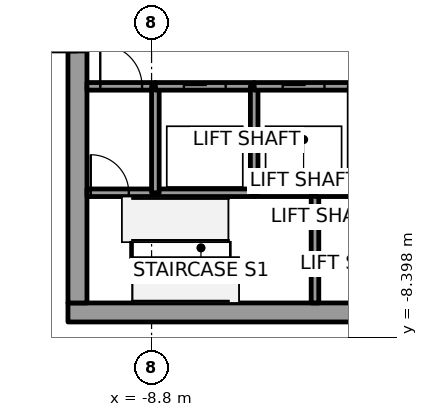
"""IFC4 building model, lengths in metres.
Left out: names, types, materials, properties, quantities, classifications, styles, units other than length and angle.
Written with IfcOpenShell. Run it as: python <this file> out.ifc"""

import sys

from ifc_helpers import new_model, si_unit, direction, frame, frame_2d, origin, place, context, subcontext, project, spatial, rectangle, extrude, element, fill, save


model = new_model("IFC4")
c1 = context("Model", 3, precision=1e-05, world=origin(), true_north=direction((0.0, 1.0)))
c2 = subcontext(c1, "Body", "Model", "MODEL_VIEW")
j1 = project(units=[si_unit("LENGTHUNIT", "METRE"), si_unit("PLANEANGLEUNIT", "RADIAN")], contexts=[c1])
p1 = place(None, origin())
s1 = spatial("IfcSite", under=j1, at=p1, CompositionType="ELEMENT")
p2 = place(p1, origin())
s2 = spatial("IfcBuilding", under=s1, at=p2, CompositionType="ELEMENT")
p3 = place(p2, frame((0.0, 0.0, 40.8)))
s3 = spatial("IfcBuildingStorey", under=s2, at=p3, CompositionType="ELEMENT", Elevation=40.8)
p4 = place(p3, frame((-11.0, -7.75, 0.0), z_axis=(0.0, 0.0, 1.0), x_axis=(1.0, 0.0, 0.0)))
e1 = element("IfcWall", 1, at=p4, inside=s3, PredefinedType="SHEAR", context=c2, shape_type="SweptSolid", body=[
    extrude(rectangle(XDim=22.0, YDim=0.5, at=frame_2d((11.0, 0.0))), origin(), (0.0, 0.0, 1.0), 7.2),
])
p5 = place(p4, frame((10.45, 0.0, 0.0)))
e2 = element("IfcOpeningElement", 2, at=p5, cuts=e1, PredefinedType="OPENING", context=c2, shape_type="SweptSolid", body=[
    extrude(rectangle(XDim=1.1, YDim=2.1, at=frame_2d((0.55, 1.05))), frame((0.0, 0.25, 0.0), z_axis=(0.0, -1.0, 0.0), x_axis=(1.0, 0.0, 0.0)), (0.0, 0.0, 1.0), 0.5),
])
p6 = place(p3, frame((-10.75, -7.5, 0.0), z_axis=(0.0, 0.0, 1.0), x_axis=(0.0, 1.0, 0.0)))
e3 = element("IfcWall", 3, at=p6, inside=s3, PredefinedType="SHEAR", context=c2, shape_type="SweptSolid", body=[
    extrude(rectangle(XDim=15.0, YDim=0.5, at=frame_2d((7.5, 0.0))), origin(), (0.0, 0.0, 1.0), 7.2),
])
p7 = place(p6, frame((6.6, 0.0, 0.0)))
e4 = element("IfcOpeningElement", 4, at=p7, cuts=e3, PredefinedType="OPENING", context=c2, shape_type="SweptSolid", body=[
    extrude(rectangle(XDim=1.8, YDim=2.1, at=frame_2d((0.9, 1.05))), frame((0.0, 0.25, 0.0), z_axis=(0.0, -1.0, 0.0), x_axis=(1.0, 0.0, 0.0)), (0.0, 0.0, 1.0), 0.5),
])
p8 = place(p3, frame((-10.5, -4.6, 0.0), z_axis=(0.0, 0.0, 1.0), x_axis=(1.0, 0.0, 0.0)))
e5 = element("IfcWall", 5, at=p8, inside=s3, PredefinedType="SOLIDWALL", context=c2, shape_type="SweptSolid", body=[
    extrude(rectangle(XDim=1.8, YDim=0.2, at=frame_2d((0.9, 0.0))), origin(), (0.0, 0.0, 1.0), 7.05),
])
p9 = place(p8, frame((0.1, 0.0, 0.0)))
e6 = element("IfcOpeningElement", 6, at=p9, cuts=e5, PredefinedType="OPENING", context=c2, shape_type="SweptSolid", body=[
    extrude(rectangle(XDim=1.0, YDim=2.1, at=frame_2d((0.5, 1.05))), frame((0.0, 0.1, 0.0), z_axis=(0.0, -1.0, 0.0), x_axis=(1.0, 0.0, 0.0)), (0.0, 0.0, 1.0), 0.2),
])
p10 = place(p3, frame((-10.5, -1.8, 0.0), z_axis=(0.0, 0.0, 1.0), x_axis=(1.0, 0.0, 0.0)))
e7 = element("IfcWall", 7, at=p10, inside=s3, PredefinedType="SOLIDWALL", context=c2, shape_type="SweptSolid", body=[
    extrude(rectangle(XDim=1.8, YDim=0.2, at=frame_2d((0.9, 0.0))), origin(), (0.0, 0.0, 1.0), 7.05),
])
p11 = place(p10, frame((0.35, 0.0, 0.0)))
e8 = element("IfcOpeningElement", 8, at=p11, cuts=e7, PredefinedType="OPENING", context=c2, shape_type="SweptSolid", body=[
    extrude(rectangle(XDim=1.1, YDim=2.1, at=frame_2d((0.55, 1.05))), frame((0.0, 0.1, 0.0), z_axis=(0.0, -1.0, 0.0), x_axis=(1.0, 0.0, 0.0)), (0.0, 0.0, 1.0), 0.2),
])
p12 = place(p3, frame((-8.7, -4.6, 0.0), z_axis=(0.0, 0.0, 1.0), x_axis=(1.0, 0.0, 0.0)))
e9 = element("IfcWall", 9, at=p12, inside=s3, PredefinedType="SOLIDWALL", context=c2, shape_type="SweptSolid", body=[
    extrude(rectangle(XDim=2.6, YDim=0.2, at=frame_2d((1.3, 0.0))), origin(), (0.0, 0.0, 1.0), 7.05),
])
p13 = place(p3, frame((-8.7, -4.6, 0.0), z_axis=(0.0, 0.0, 1.0), x_axis=(0.0, 1.0, 0.0)))
e10 = element("IfcWall", 10, at=p13, inside=s3, PredefinedType="SOLIDWALL", context=c2, shape_type="SweptSolid", body=[
    extrude(rectangle(XDim=2.8, YDim=0.2, at=frame_2d((1.4, 0.0))), origin(), (0.0, 0.0, 1.0), 7.05),
])
p14 = place(p3, frame((-8.7, -1.8, 0.0), z_axis=(0.0, 0.0, 1.0), x_axis=(1.0, 0.0, 0.0)))
e11 = element("IfcWall", 11, at=p14, inside=s3, PredefinedType="SOLIDWALL", context=c2, shape_type="SweptSolid", body=[
    extrude(rectangle(XDim=2.6, YDim=0.2, at=frame_2d((1.3, 0.0))), origin(), (0.0, 0.0, 1.0), 7.05),
])
p15 = place(p14, frame((0.75, 0.0, 0.0)))
e12 = element("IfcOpeningElement", 12, at=p15, cuts=e11, PredefinedType="OPENING", context=c2, shape_type="SweptSolid", body=[
    extrude(rectangle(XDim=1.1, YDim=2.1, at=frame_2d((0.55, 1.05))), frame((0.0, 0.1, 0.0), z_axis=(0.0, -1.0, 0.0), x_axis=(1.0, 0.0, 0.0)), (0.0, 0.0, 1.0), 0.2),
])
p16 = place(p3, frame((-6.1, -4.6, 0.0), z_axis=(0.0, 0.0, 1.0), x_axis=(1.0, 0.0, 0.0)))
e13 = element("IfcWall", 13, at=p16, inside=s3, PredefinedType="SOLIDWALL", context=c2, shape_type="SweptSolid", body=[
    extrude(rectangle(XDim=1.6, YDim=0.2, at=frame_2d((0.8, 0.0))), origin(), (0.0, 0.0, 1.0), 7.05),
])
p17 = place(p3, frame((-6.1, -4.6, 0.0), z_axis=(0.0, 0.0, 1.0), x_axis=(0.0, 1.0, 0.0)))
e14 = element("IfcWall", 14, at=p17, inside=s3, PredefinedType="SOLIDWALL", context=c2, shape_type="SweptSolid", body=[
    extrude(rectangle(XDim=2.8, YDim=0.2, at=frame_2d((1.4, 0.0))), origin(), (0.0, 0.0, 1.0), 7.05),
])
p18 = place(p3, frame((-6.1, -1.8, 0.0), z_axis=(0.0, 0.0, 1.0), x_axis=(1.0, 0.0, 0.0)))
e15 = element("IfcWall", 15, at=p18, inside=s3, PredefinedType="SOLIDWALL", context=c2, shape_type="SweptSolid", body=[
    extrude(rectangle(XDim=2.6, YDim=0.2, at=frame_2d((1.3, 0.0))), origin(), (0.0, 0.0, 1.0), 7.05),
])
p19 = place(p18, frame((0.75, 0.0, 0.0)))
e16 = element("IfcOpeningElement", 16, at=p19, cuts=e15, PredefinedType="OPENING", context=c2, shape_type="SweptSolid", body=[
    extrude(rectangle(XDim=1.1, YDim=2.1, at=frame_2d((0.55, 1.05))), frame((0.0, 0.1, 0.0), z_axis=(0.0, -1.0, 0.0), x_axis=(1.0, 0.0, 0.0)), (0.0, 0.0, 1.0), 0.2),
])
p20 = place(p3, frame((-4.5, -4.6, 0.0), z_axis=(0.0, 0.0, 1.0), x_axis=(0.0, -1.0, 0.0)))
e17 = element("IfcWall", 17, at=p20, inside=s3, PredefinedType="SOLIDWALL", context=c2, shape_type="SweptSolid", body=[
    extrude(rectangle(XDim=2.9, YDim=0.2, at=frame_2d((1.45, 0.0))), origin(), (0.0, 0.0, 1.0), 7.05),
])
p21 = place(p3, frame((-4.5, -4.6, 0.0), z_axis=(0.0, 0.0, 1.0), x_axis=(1.0, 0.0, 0.0)))
e18 = element("IfcWall", 18, at=p21, inside=s3, PredefinedType="SOLIDWALL", context=c2, shape_type="SweptSolid", body=[
    extrude(rectangle(XDim=1.0, YDim=0.2, at=frame_2d((0.5, 0.0))), origin(), (0.0, 0.0, 1.0), 7.05),
])
p22 = place(p15, origin())
e19 = element("IfcDoor", 19, at=p22, inside=s3, OperationType="SLIDING_TO_RIGHT", PredefinedType="DOOR", context=c2, shape_type="SweptSolid", body=[
    extrude(rectangle(XDim=1.1, YDim=2.1, at=frame_2d((0.55, 1.05))), frame((0.0, 0.025, 0.0), z_axis=(0.0, -1.0, 0.0), x_axis=(1.0, 0.0, 0.0)), (0.0, 0.0, 1.0), 0.05),
])
fill(e12, e19)
p23 = place(p19, origin())
e20 = element("IfcDoor", 20, at=p23, inside=s3, OperationType="SLIDING_TO_LEFT", PredefinedType="DOOR", context=c2, shape_type="SweptSolid", body=[
    extrude(rectangle(XDim=1.1, YDim=2.1, at=frame_2d((0.55, 1.05))), frame((0.0, 0.025, 0.0), z_axis=(0.0, -1.0, 0.0), x_axis=(1.0, 0.0, 0.0)), (0.0, 0.0, 1.0), 0.05),
])
fill(e16, e20)
p24 = place(p11, origin())
e21 = element("IfcDoor", 21, at=p24, inside=s3, OperationType="SINGLE_SWING_LEFT", PredefinedType="DOOR", context=c2, shape_type="SweptSolid", body=[
    extrude(rectangle(XDim=1.1, YDim=2.1, at=frame_2d((0.55, 1.05))), frame((0.0, 0.025, 0.0), z_axis=(0.0, -1.0, 0.0), x_axis=(1.0, 0.0, 0.0)), (0.0, 0.0, 1.0), 0.05),
])
fill(e8, e21)
p25 = place(p9, origin())
e22 = element("IfcDoor", 22, at=p25, inside=s3, OperationType="SINGLE_SWING_LEFT", PredefinedType="DOOR", context=c2, shape_type="SweptSolid", body=[
    extrude(rectangle(XDim=1.0, YDim=2.1, at=frame_2d((0.5, 1.05))), frame((0.0, 0.025, 0.0), z_axis=(0.0, -1.0, 0.0), x_axis=(1.0, 0.0, 0.0)), (0.0, 0.0, 1.0), 0.05),
])
fill(e6, e22)
p26 = place(p7, origin())
e23 = element("IfcDoor", 23, at=p26, inside=s3, OperationType="DOUBLE_DOOR_SINGLE_SWING", PredefinedType="DOOR", context=c2, shape_type="SweptSolid", body=[
    extrude(rectangle(XDim=1.8, YDim=2.1, at=frame_2d((0.9, 1.05))), frame((0.0, 0.025, 0.0), z_axis=(0.0, -1.0, 0.0), x_axis=(1.0, 0.0, 0.0)), (0.0, 0.0, 1.0), 0.05),
])
fill(e4, e23)
save(model, sys.argv[1])
